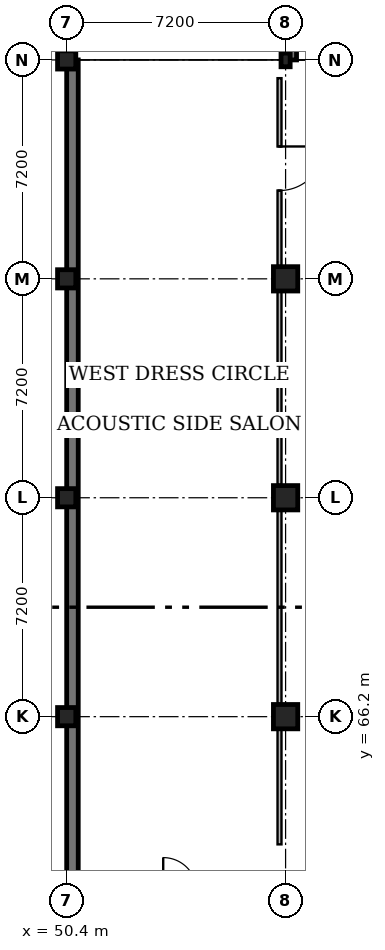
"""IFC4 building model, lengths in metres.
Left out: names, types, materials, properties, quantities, classifications, styles, units other than length and angle.
Written with IfcOpenShell. Run it as: python <this file> out.ifc"""

import sys

from ifc_helpers import new_model, si_unit, direction, frame, frame_2d, origin, origin_2d, place, context, subcontext, project, spatial, rectangle, i_section, extrude, element, fill, save


model = new_model("IFC4")
c1 = context("Model", 3, precision=1e-05, world=origin(), true_north=direction((0.0, 1.0)))
c2 = subcontext(c1, "Body", "Model", "MODEL_VIEW")
j1 = project(units=[si_unit("LENGTHUNIT", "METRE"), si_unit("PLANEANGLEUNIT", "RADIAN")], contexts=[c1])
p1 = place(None, origin())
s1 = spatial("IfcSite", under=j1, at=p1, CompositionType="ELEMENT")
p2 = place(p1, origin())
s2 = spatial("IfcBuilding", under=s1, at=p2, CompositionType="ELEMENT")
p3 = place(p2, frame((0.0, 0.0, 4.8)))
s3 = spatial("IfcBuildingStorey", under=s2, at=p3, CompositionType="ELEMENT", Elevation=4.8)
for number, where, z_axis, x_axis in (
    (1, (50.4, 66.2, 0.0), (0.0, 0.0, 1.0), (1.0, 0.0, 0.0)),
    (2, (50.4, 73.4, 0.0), (0.0, 0.0, 1.0), (1.0, 0.0, 0.0)),
    (3, (50.4, 80.6, 0.0), (0.0, 0.0, 1.0), (1.0, 0.0, 0.0)),
    (4, (50.4, 87.8, 0.0), (0.0, 0.0, 1.0), (1.0, 0.0, 0.0)),
):
    element("IfcColumn", number, at=place(p3, frame(where, z_axis=z_axis, x_axis=x_axis)), inside=s3, PredefinedType="COLUMN", context=c2, shape_type="SweptSolid", body=[
        extrude(rectangle(XDim=0.6, YDim=0.6, at=origin_2d()), origin(), (0.0, 0.0, 1.0), 4.2),
    ])
for number, where, z_axis, x_axis in (
    (5, (57.6, 66.2, 0.0), (0.0, 0.0, 1.0), (1.0, 0.0, 0.0)),
    (6, (57.6, 73.4, 0.0), (0.0, 0.0, 1.0), (1.0, 0.0, 0.0)),
    (7, (57.6, 80.6, 0.0), (0.0, 0.0, 1.0), (1.0, 0.0, 0.0)),
):
    element("IfcColumn", number, at=place(p3, frame(where, z_axis=z_axis, x_axis=x_axis)), inside=s3, PredefinedType="COLUMN", context=c2, shape_type="SweptSolid", body=[
        extrude(rectangle(XDim=0.8, YDim=0.8, at=origin_2d()), origin(), (0.0, 0.0, 1.0), 4.2),
    ])
p4 = place(p3, frame((57.6, 87.8, 0.0), z_axis=(0.0, 0.0, 1.0), x_axis=(1.0, 0.0, 0.0)))
e8 = element("IfcColumn", 8, at=p4, inside=s3, PredefinedType="COLUMN", context=c2, shape_type="SweptSolid", body=[
    extrude(i_section(OverallWidth=0.3, OverallDepth=0.45, WebThickness=0.014, FlangeThickness=0.026, FilletRadius=0.027, at=origin_2d()), origin(), (0.0, 0.0, 1.0), 4.2),
])
p5 = place(p3, frame((50.59, 51.8, 0.0), z_axis=(0.0, 0.0, 1.0), x_axis=(0.0, 1.0, 0.0)))
e9 = element("IfcWall", 9, at=p5, inside=s3, PredefinedType="SOLIDWALL", context=c2, shape_type="SweptSolid", body=[
    extrude(rectangle(XDim=36.0, YDim=0.38, at=frame_2d((18.0, 0.0))), origin(), (0.0, 0.0, 1.0), 3.94),
])
p6 = place(p3, frame((57.78, 87.8, 0.0), z_axis=(0.0, 0.0, 1.0), x_axis=(0.0, 1.0, 0.0)))
e10 = element("IfcWall", 10, at=p6, inside=s3, PredefinedType="SOLIDWALL", context=c2, shape_type="SweptSolid", body=[
    extrude(rectangle(XDim=24.0, YDim=0.36, at=frame_2d((12.0, 0.0))), origin(), (0.0, 0.0, 1.0), 3.94),
])
p7 = place(p3, frame((57.4, 87.2, 0.0), z_axis=(0.0, 0.0, 1.0), x_axis=(0.0, -1.0, 0.0)))
e11 = element("IfcWall", 11, at=p7, inside=s3, PredefinedType="PARTITIONING", context=c2, shape_type="SweptSolid", body=[
    extrude(rectangle(XDim=6.18, YDim=0.13, at=frame_2d((3.09, 0.0))), origin(), (0.0, 0.0, 1.0), 3.55),
])
p8 = place(p7, frame((2.247, 0.0, 0.0)))
e12 = element("IfcOpeningElement", 12, at=p8, cuts=e11, PredefinedType="OPENING", context=c2, shape_type="SweptSolid", body=[
    extrude(rectangle(XDim=1.45, YDim=2.2, at=frame_2d((0.725, 1.1))), frame((0.0, 0.085, 0.0), z_axis=(0.0, -1.0, 0.0), x_axis=(1.0, 0.0, 0.0)), (0.0, 0.0, 1.0), 0.17),
])
for number, where, z_axis, x_axis in (
    (13, (57.4, 80.18, 0.0), (0.0, 0.0, 1.0), (0.0, -1.0, 0.0)),
    (14, (57.4, 72.98, 0.0), (0.0, 0.0, 1.0), (0.0, -1.0, 0.0)),
):
    element("IfcWall", number, at=place(p3, frame(where, z_axis=z_axis, x_axis=x_axis)), inside=s3, PredefinedType="PARTITIONING", context=c2, shape_type="SweptSolid", body=[
        extrude(rectangle(XDim=6.36, YDim=0.13, at=frame_2d((3.18, 0.0))), origin(), (0.0, 0.0, 1.0), 3.55),
    ])
p9 = place(p3, frame((57.4, 65.78, 0.0), z_axis=(0.0, 0.0, 1.0), x_axis=(0.0, -1.0, 0.0)))
e15 = element("IfcWall", 15, at=p9, inside=s3, PredefinedType="PARTITIONING", context=c2, shape_type="SweptSolid", body=[
    extrude(rectangle(XDim=3.78, YDim=0.13, at=frame_2d((1.89, 0.0))), origin(), (0.0, 0.0, 1.0), 3.55),
])
p10 = place(p8, origin())
e16 = element("IfcDoor", 16, at=p10, inside=s3, OperationType="DOUBLE_DOOR_SINGLE_SWING", PredefinedType="DOOR", context=c2, shape_type="SweptSolid", body=[
    extrude(rectangle(XDim=1.45, YDim=2.2, at=frame_2d((0.725, 1.1))), frame((0.0, 0.025, 0.0), z_axis=(0.0, -1.0, 0.0), x_axis=(1.0, 0.0, 0.0)), (0.0, 0.0, 1.0), 0.05),
])
fill(e12, e16)
save(model, sys.argv[1])
